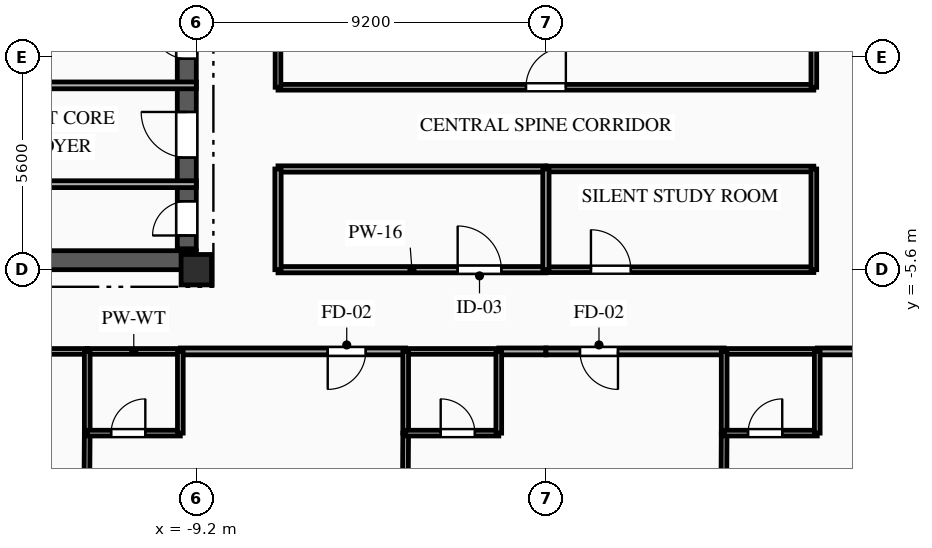
"""IFC4 building model, lengths in metres.
Left out: names, types, materials, properties, quantities, classifications, styles, units other than length and angle.
Written with IfcOpenShell. Run it as: python <this file> out.ifc"""

import sys

from ifc_helpers import new_model, si_unit, direction, frame, frame_2d, origin, origin_2d, place, context, subcontext, project, spatial, rectangle, extrude, element, fill, save


model = new_model("IFC4")
c1 = context("Model", 3, precision=1e-05, world=origin(), true_north=direction((0.0, 1.0)))
c2 = subcontext(c1, "Body", "Model", "MODEL_VIEW")
j1 = project(units=[si_unit("LENGTHUNIT", "METRE"), si_unit("PLANEANGLEUNIT", "RADIAN")], contexts=[c1])
p1 = place(None, origin())
s1 = spatial("IfcSite", under=j1, at=p1, CompositionType="ELEMENT")
p2 = place(p1, origin())
s2 = spatial("IfcBuilding", under=s1, at=p2, CompositionType="ELEMENT")
p3 = place(p2, frame((0.0, 0.0, 193.05)))
s3 = spatial("IfcBuildingStorey", under=s2, at=p3, CompositionType="ELEMENT", Elevation=193.05)
p4 = place(p3, frame((-9.2, -5.6, 0.0), z_axis=(0.0, 0.0, 1.0), x_axis=(1.0, 0.0, 0.0)))
e1 = element("IfcColumn", 1, at=p4, inside=s3, PredefinedType="COLUMN", context=c2, shape_type="SweptSolid", body=[
    extrude(rectangle(XDim=0.8, YDim=0.8, at=origin_2d()), origin(), (0.0, 0.0, 1.0), 3.35),
])
p5 = place(p3, frame((-18.8, -5.35, 0.0), z_axis=(0.0, 0.0, 1.0), x_axis=(1.0, 0.0, 0.0)))
e2 = element("IfcWall", 2, at=p5, inside=s3, PredefinedType="SHEAR", context=c2, shape_type="SweptSolid", body=[
    extrude(rectangle(XDim=9.6, YDim=0.5, at=frame_2d((4.8, 0.0))), origin(), (0.0, 0.0, 1.0), 3.04),
])
p6 = place(p5, frame((1.05, 0.0, 0.0)))
e3 = element("IfcOpeningElement", 3, at=p6, cuts=e2, PredefinedType="OPENING", context=c2, shape_type="SweptSolid", body=[
    extrude(rectangle(XDim=0.9, YDim=2.1, at=frame_2d((0.45, 1.05))), frame((0.0, 0.26, 0.0), z_axis=(0.0, -1.0, 0.0), x_axis=(1.0, 0.0, 0.0)), (0.0, 0.0, 1.0), 0.52),
])
p7 = place(p3, frame((-9.45, -5.05, 0.0), z_axis=(0.0, 0.0, 1.0), x_axis=(0.0, 1.0, 0.0)))
e4 = element("IfcWall", 4, at=p7, inside=s3, PredefinedType="SHEAR", context=c2, shape_type="SweptSolid", body=[
    extrude(rectangle(XDim=10.1, YDim=0.5, at=frame_2d((5.05, 0.0))), origin(), (0.0, 0.0, 1.0), 3.04),
])
p8 = place(p7, frame((7.15, 0.0, 0.0)))
e5 = element("IfcOpeningElement", 5, at=p8, cuts=e4, PredefinedType="OPENING", context=c2, shape_type="SweptSolid", body=[
    extrude(rectangle(XDim=0.9, YDim=2.1, at=frame_2d((0.45, 1.05))), frame((0.0, 0.26, 0.0), z_axis=(0.0, -1.0, 0.0), x_axis=(1.0, 0.0, 0.0)), (0.0, 0.0, 1.0), 0.52),
])
p9 = place(p7, frame((2.4, 0.0, 0.0)))
e6 = element("IfcOpeningElement", 6, at=p9, cuts=e4, PredefinedType="OPENING", context=c2, shape_type="SweptSolid", body=[
    extrude(rectangle(XDim=1.2, YDim=2.15, at=frame_2d((0.6, 1.075))), frame((0.0, 0.26, 0.0), z_axis=(0.0, -1.0, 0.0), x_axis=(1.0, 0.0, 0.0)), (0.0, 0.0, 1.0), 0.52),
])
p10 = place(p7, frame((0.35, 0.0, 0.0)))
e7 = element("IfcOpeningElement", 7, at=p10, cuts=e4, PredefinedType="OPENING", context=c2, shape_type="SweptSolid", body=[
    extrude(rectangle(XDim=0.9, YDim=2.1, at=frame_2d((0.45, 1.05))), frame((0.0, 0.26, 0.0), z_axis=(0.0, -1.0, 0.0), x_axis=(1.0, 0.0, 0.0)), (0.0, 0.0, 1.0), 0.52),
])
p11 = place(p7, frame((5.0, 0.0, 0.0)))
e8 = element("IfcOpeningElement", 8, at=p11, cuts=e4, PredefinedType="OPENING", context=c2, shape_type="SweptSolid", body=[
    extrude(rectangle(XDim=0.9, YDim=2.1, at=frame_2d((0.45, 1.05))), frame((0.0, 0.26, 0.0), z_axis=(0.0, -1.0, 0.0), x_axis=(1.0, 0.0, 0.0)), (0.0, 0.0, 1.0), 0.52),
])
p12 = place(p3, frame((-15.05, -3.35, 0.0), z_axis=(0.0, 0.0, 1.0), x_axis=(1.0, 0.0, 0.0)))
e9 = element("IfcWall", 9, at=p12, inside=s3, PredefinedType="PARTITIONING", context=c2, shape_type="SweptSolid", body=[
    extrude(rectangle(XDim=5.85, YDim=0.18, at=frame_2d((2.925, 0.0))), origin(), (0.0, 0.0, 1.0), 2.755),
])
p13 = place(p3, frame((-9.2, -0.75, 0.0), z_axis=(0.0, 0.0, 1.0), x_axis=(-1.0, 0.0, 0.0)))
e10 = element("IfcWall", 10, at=p13, inside=s3, PredefinedType="PARTITIONING", context=c2, shape_type="SweptSolid", body=[
    extrude(rectangle(XDim=5.85, YDim=0.18, at=frame_2d((2.925, 0.0))), origin(), (0.0, 0.0, 1.0), 3.04),
])
p14 = place(p3, frame((-12.07, -7.75, 0.0), z_axis=(0.0, 0.0, 1.0), x_axis=(-1.0, 0.0, 0.0)))
e11 = element("IfcWall", 11, at=p14, inside=s3, PredefinedType="PARTITIONING", context=c2, shape_type="SweptSolid", body=[
    extrude(rectangle(XDim=8.88, YDim=0.15, at=frame_2d((4.44, 0.0))), origin(), (0.0, 0.0, 1.0), 3.04),
])
p15 = place(p14, frame((1.414, 0.0, 0.0)))
e12 = element("IfcOpeningElement", 12, at=p15, cuts=e11, PredefinedType="OPENING", context=c2, shape_type="SweptSolid", body=[
    extrude(rectangle(XDim=1.05, YDim=2.15, at=frame_2d((0.525, 1.075))), frame((0.0, 0.085, 0.0), z_axis=(0.0, -1.0, 0.0), x_axis=(1.0, 0.0, 0.0)), (0.0, 0.0, 1.0), 0.17),
])
p16 = place(p3, frame((-3.69, -7.75, 0.0), z_axis=(0.0, 0.0, 1.0), x_axis=(-1.0, 0.0, 0.0)))
e13 = element("IfcWall", 13, at=p16, inside=s3, PredefinedType="PARTITIONING", context=c2, shape_type="SweptSolid", body=[
    extrude(rectangle(XDim=5.93, YDim=0.18, at=frame_2d((2.965, 0.0))), origin(), (0.0, 0.0, 1.0), 3.04),
])
p17 = place(p16, frame((1.051, 0.0, 0.0)))
e14 = element("IfcOpeningElement", 14, at=p17, cuts=e13, PredefinedType="OPENING", context=c2, shape_type="SweptSolid", body=[
    extrude(rectangle(XDim=1.0, YDim=2.15, at=frame_2d((0.5, 1.075))), frame((0.0, 0.1, 0.0), z_axis=(0.0, -1.0, 0.0), x_axis=(1.0, 0.0, 0.0)), (0.0, 0.0, 1.0), 0.2),
])
p18 = place(p3, frame((-9.62, -7.75, 0.0), z_axis=(0.0, 0.0, 1.0), x_axis=(-1.0, 0.0, 0.0)))
e15 = element("IfcWall", 15, at=p18, inside=s3, PredefinedType="PLUMBINGWALL", context=c2, shape_type="SweptSolid", body=[
    extrude(rectangle(XDim=2.45, YDim=0.15, at=frame_2d((1.225, 0.0))), origin(), (0.0, 0.0, 1.0), 3.04),
])
p19 = place(p3, frame((0.0, -7.75, 0.0), z_axis=(0.0, 0.0, 1.0), x_axis=(-1.0, 0.0, 0.0)))
e16 = element("IfcWall", 16, at=p19, inside=s3, PredefinedType="PARTITIONING", context=c2, shape_type="SweptSolid", body=[
    extrude(rectangle(XDim=1.24, YDim=0.18, at=frame_2d((0.62, 0.0))), origin(), (0.0, 0.0, 1.0), 3.04),
])
p20 = place(p3, frame((-1.24, -7.75, 0.0), z_axis=(0.0, 0.0, 1.0), x_axis=(-1.0, 0.0, 0.0)))
e17 = element("IfcWall", 17, at=p20, inside=s3, PredefinedType="PLUMBINGWALL", context=c2, shape_type="SweptSolid", body=[
    extrude(rectangle(XDim=2.45, YDim=0.15, at=frame_2d((1.225, 0.0))), origin(), (0.0, 0.0, 1.0), 3.04),
])
p21 = place(p3, frame((-7.05, -5.6, 0.0), z_axis=(0.0, 0.0, 1.0), x_axis=(1.0, 0.0, 0.0)))
e18 = element("IfcWall", 18, at=p21, inside=s3, PredefinedType="PARTITIONING", context=c2, shape_type="SweptSolid", body=[
    extrude(rectangle(XDim=7.05, YDim=0.165, at=frame_2d((3.525, 0.0))), origin(), (0.0, 0.0, 1.0), 2.525),
])
p22 = place(p21, frame((4.728, 0.0, 0.0)))
e19 = element("IfcOpeningElement", 19, at=p22, cuts=e18, PredefinedType="OPENING", context=c2, shape_type="SweptSolid", body=[
    extrude(rectangle(XDim=1.15, YDim=2.15, at=frame_2d((0.575, 1.075))), frame((0.0, 0.093, 0.0), z_axis=(0.0, -1.0, 0.0), x_axis=(1.0, 0.0, 0.0)), (0.0, 0.0, 1.0), 0.185),
])
p23 = place(p3, frame((4.69, -7.75, 0.0), z_axis=(0.0, 0.0, 1.0), x_axis=(-1.0, 0.0, 0.0)))
e20 = element("IfcWall", 20, at=p23, inside=s3, PredefinedType="PARTITIONING", context=c2, shape_type="SweptSolid", body=[
    extrude(rectangle(XDim=4.69, YDim=0.18, at=frame_2d((2.345, 0.0))), origin(), (0.0, 0.0, 1.0), 3.04),
])
p24 = place(p23, frame((2.794, 0.0, 0.0)))
e21 = element("IfcOpeningElement", 21, at=p24, cuts=e20, PredefinedType="OPENING", context=c2, shape_type="SweptSolid", body=[
    extrude(rectangle(XDim=1.0, YDim=2.15, at=frame_2d((0.5, 1.075))), frame((0.0, 0.1, 0.0), z_axis=(0.0, -1.0, 0.0), x_axis=(1.0, 0.0, 0.0)), (0.0, 0.0, 1.0), 0.2),
])
p25 = place(p3, frame((13.07, -7.75, 0.0), z_axis=(0.0, 0.0, 1.0), x_axis=(-1.0, 0.0, 0.0)))
e22 = element("IfcWall", 22, at=p25, inside=s3, PredefinedType="PARTITIONING", context=c2, shape_type="SweptSolid", body=[
    extrude(rectangle(XDim=5.93, YDim=0.18, at=frame_2d((2.965, 0.0))), origin(), (0.0, 0.0, 1.0), 3.04),
])
p26 = place(p25, frame((1.051, 0.0, 0.0)))
e23 = element("IfcOpeningElement", 23, at=p26, cuts=e22, PredefinedType="OPENING", context=c2, shape_type="SweptSolid", body=[
    extrude(rectangle(XDim=1.0, YDim=2.15, at=frame_2d((0.5, 1.075))), frame((0.0, 0.1, 0.0), z_axis=(0.0, -1.0, 0.0), x_axis=(1.0, 0.0, 0.0)), (0.0, 0.0, 1.0), 0.2),
])
p27 = place(p3, frame((7.14, -7.75, 0.0), z_axis=(0.0, 0.0, 1.0), x_axis=(-1.0, 0.0, 0.0)))
e24 = element("IfcWall", 24, at=p27, inside=s3, PredefinedType="PLUMBINGWALL", context=c2, shape_type="SweptSolid", body=[
    extrude(rectangle(XDim=2.45, YDim=0.15, at=frame_2d((1.225, 0.0))), origin(), (0.0, 0.0, 1.0), 3.04),
])
p28 = place(p3, frame((0.0, -5.6, 0.0), z_axis=(0.0, 0.0, 1.0), x_axis=(1.0, 0.0, 0.0)))
e25 = element("IfcWall", 25, at=p28, inside=s3, PredefinedType="PARTITIONING", context=c2, shape_type="SweptSolid", body=[
    extrude(rectangle(XDim=7.05, YDim=0.15, at=frame_2d((3.525, 0.0))), origin(), (0.0, 0.0, 1.0), 2.525),
])
p29 = place(p28, frame((1.185, 0.0, 0.0)))
e26 = element("IfcOpeningElement", 26, at=p29, cuts=e25, PredefinedType="OPENING", context=c2, shape_type="SweptSolid", body=[
    extrude(rectangle(XDim=1.05, YDim=2.15, at=frame_2d((0.525, 1.075))), frame((0.0, 0.085, 0.0), z_axis=(0.0, -1.0, 0.0), x_axis=(1.0, 0.0, 0.0)), (0.0, 0.0, 1.0), 0.17),
])
p30 = place(p3, frame((-7.05, -0.8, 0.0), z_axis=(0.0, 0.0, 1.0), x_axis=(1.0, 0.0, 0.0)))
e27 = element("IfcWall", 27, at=p30, inside=s3, PredefinedType="PARTITIONING", context=c2, shape_type="SweptSolid", body=[
    extrude(rectangle(XDim=14.1, YDim=0.15, at=frame_2d((7.05, 0.0))), origin(), (0.0, 0.0, 1.0), 3.04),
])
p31 = place(p30, frame((6.525, 0.0, 0.0)))
e28 = element("IfcOpeningElement", 28, at=p31, cuts=e27, PredefinedType="OPENING", context=c2, shape_type="SweptSolid", body=[
    extrude(rectangle(XDim=1.05, YDim=2.15, at=frame_2d((0.525, 1.075))), frame((0.0, 0.085, 0.0), z_axis=(0.0, -1.0, 0.0), x_axis=(1.0, 0.0, 0.0)), (0.0, 0.0, 1.0), 0.17),
])
p32 = place(p3, frame((0.0, -2.95, 0.0), z_axis=(0.0, 0.0, 1.0), x_axis=(-1.0, 0.0, 0.0)))
e29 = element("IfcWall", 29, at=p32, inside=s3, PredefinedType="PARTITIONING", context=c2, shape_type="SweptSolid", body=[
    extrude(rectangle(XDim=7.05, YDim=0.165, at=frame_2d((3.525, 0.0))), origin(), (0.0, 0.0, 1.0), 3.04),
])
p33 = place(p3, frame((7.05, -2.95, 0.0), z_axis=(0.0, 0.0, 1.0), x_axis=(-1.0, 0.0, 0.0)))
e30 = element("IfcWall", 30, at=p33, inside=s3, PredefinedType="PARTITIONING", context=c2, shape_type="SweptSolid", body=[
    extrude(rectangle(XDim=7.05, YDim=0.15, at=frame_2d((3.525, 0.0))), origin(), (0.0, 0.0, 1.0), 3.04),
])
p34 = place(p3, frame((-7.05, 8.5, 0.0), z_axis=(0.0, 0.0, 1.0), x_axis=(0.0, -1.0, 0.0)))
e31 = element("IfcWall", 31, at=p34, inside=s3, PredefinedType="PARTITIONING", context=c2, shape_type="SweptSolid", body=[
    extrude(rectangle(XDim=9.3, YDim=0.15, at=frame_2d((4.65, 0.0))), origin(), (0.0, 0.0, 1.0), 3.04),
])
p35 = place(p3, frame((-7.05, -2.95, 0.0), z_axis=(0.0, 0.0, 1.0), x_axis=(0.0, -1.0, 0.0)))
e32 = element("IfcWall", 32, at=p35, inside=s3, PredefinedType="PARTITIONING", context=c2, shape_type="SweptSolid", body=[
    extrude(rectangle(XDim=2.65, YDim=0.165, at=frame_2d((1.325, 0.0))), origin(), (0.0, 0.0, 1.0), 3.04),
])
p36 = place(p3, frame((7.05, -0.8, 0.0), z_axis=(0.0, 0.0, 1.0), x_axis=(0.0, 1.0, 0.0)))
e33 = element("IfcWall", 33, at=p36, inside=s3, PredefinedType="PARTITIONING", context=c2, shape_type="SweptSolid", body=[
    extrude(rectangle(XDim=9.3, YDim=0.15, at=frame_2d((4.65, 0.0))), origin(), (0.0, 0.0, 1.0), 3.04),
])
p37 = place(p3, frame((7.05, -5.6, 0.0), z_axis=(0.0, 0.0, 1.0), x_axis=(0.0, 1.0, 0.0)))
e34 = element("IfcWall", 34, at=p37, inside=s3, PredefinedType="PARTITIONING", context=c2, shape_type="SweptSolid", body=[
    extrude(rectangle(XDim=2.65, YDim=0.15, at=frame_2d((1.325, 0.0))), origin(), (0.0, 0.0, 1.0), 3.04),
])
p38 = place(p3, frame((-12.07, -9.9, 0.0), z_axis=(0.0, 0.0, 1.0), x_axis=(-0.006915995357, -0.999976084218, 0.0)))
e35 = element("IfcWall", 35, at=p38, inside=s3, PredefinedType="PARTITIONING", context=c2, shape_type="SweptSolid", body=[
    extrude(rectangle(XDim=6.354, YDim=0.15, at=frame_2d((3.177, 0.0))), origin(), (0.0, 0.0, 1.0), 3.04),
])
p39 = place(p3, frame((-12.07, -7.75, 0.0), z_axis=(0.0, 0.0, 1.0), x_axis=(0.0, -1.0, 0.0)))
e36 = element("IfcWall", 36, at=p39, inside=s3, PredefinedType="PLUMBINGWALL", context=c2, shape_type="SweptSolid", body=[
    extrude(rectangle(XDim=2.15, YDim=0.15, at=frame_2d((1.075, 0.0))), origin(), (0.0, 0.0, 1.0), 3.04),
])
p40 = place(p3, frame((-12.07, -9.9, 0.0), z_axis=(0.0, 0.0, 1.0), x_axis=(1.0, 0.0, 0.0)))
e37 = element("IfcWall", 37, at=p40, inside=s3, PredefinedType="PLUMBINGWALL", context=c2, shape_type="SweptSolid", body=[
    extrude(rectangle(XDim=2.45, YDim=0.15, at=frame_2d((1.225, 0.0))), origin(), (0.0, 0.0, 1.0), 3.04),
])
p41 = place(p40, frame((0.629, 0.0, 0.0)))
e38 = element("IfcOpeningElement", 38, at=p41, cuts=e37, PredefinedType="OPENING", context=c2, shape_type="SweptSolid", body=[
    extrude(rectangle(XDim=0.9, YDim=2.1, at=frame_2d((0.45, 1.05))), frame((0.0, 0.085, 0.0), z_axis=(0.0, -1.0, 0.0), x_axis=(1.0, 0.0, 0.0)), (0.0, 0.0, 1.0), 0.17),
])
p42 = place(p3, frame((-9.62, -9.9, 0.0), z_axis=(0.0, 0.0, 1.0), x_axis=(0.0, 1.0, 0.0)))
e39 = element("IfcWall", 39, at=p42, inside=s3, PredefinedType="PLUMBINGWALL", context=c2, shape_type="SweptSolid", body=[
    extrude(rectangle(XDim=2.15, YDim=0.15, at=frame_2d((1.075, 0.0))), origin(), (0.0, 0.0, 1.0), 2.665),
])
p43 = place(p3, frame((-3.69, -9.9, 0.0), z_axis=(0.0, 0.0, 1.0), x_axis=(-0.006074196988, -0.999981551895, 0.0)))
e40 = element("IfcWall", 40, at=p43, inside=s3, PredefinedType="PARTITIONING", context=c2, shape_type="SweptSolid", body=[
    extrude(rectangle(XDim=7.235, YDim=0.15, at=frame_2d((3.617, 0.0))), origin(), (0.0, 0.0, 1.0), 3.04),
])
p44 = place(p3, frame((-3.69, -7.75, 0.0), z_axis=(0.0, 0.0, 1.0), x_axis=(0.0, -1.0, 0.0)))
e41 = element("IfcWall", 41, at=p44, inside=s3, PredefinedType="PLUMBINGWALL", context=c2, shape_type="SweptSolid", body=[
    extrude(rectangle(XDim=2.15, YDim=0.15, at=frame_2d((1.075, 0.0))), origin(), (0.0, 0.0, 1.0), 3.04),
])
p45 = place(p3, frame((-3.69, -9.9, 0.0), z_axis=(0.0, 0.0, 1.0), x_axis=(1.0, 0.0, 0.0)))
e42 = element("IfcWall", 42, at=p45, inside=s3, PredefinedType="PLUMBINGWALL", context=c2, shape_type="SweptSolid", body=[
    extrude(rectangle(XDim=2.45, YDim=0.15, at=frame_2d((1.225, 0.0))), origin(), (0.0, 0.0, 1.0), 3.04),
])
p46 = place(p45, frame((0.921, 0.0, 0.0)))
e43 = element("IfcOpeningElement", 43, at=p46, cuts=e42, PredefinedType="OPENING", context=c2, shape_type="SweptSolid", body=[
    extrude(rectangle(XDim=0.9, YDim=2.1, at=frame_2d((0.45, 1.05))), frame((0.0, 0.085, 0.0), z_axis=(0.0, -1.0, 0.0), x_axis=(1.0, 0.0, 0.0)), (0.0, 0.0, 1.0), 0.17),
])
p47 = place(p3, frame((-1.24, -9.9, 0.0), z_axis=(0.0, 0.0, 1.0), x_axis=(0.0, 1.0, 0.0)))
e44 = element("IfcWall", 44, at=p47, inside=s3, PredefinedType="PLUMBINGWALL", context=c2, shape_type="SweptSolid", body=[
    extrude(rectangle(XDim=2.15, YDim=0.15, at=frame_2d((1.075, 0.0))), origin(), (0.0, 0.0, 1.0), 3.04),
])
p48 = place(p3, frame((4.69, -9.9, 0.0), z_axis=(0.0, 0.0, 1.0), x_axis=(-0.005414920161, -0.999985339212, 0.0)))
e45 = element("IfcWall", 45, at=p48, inside=s3, PredefinedType="PARTITIONING", context=c2, shape_type="SweptSolid", body=[
    extrude(rectangle(XDim=8.115, YDim=0.15, at=frame_2d((4.058, 0.0))), origin(), (0.0, 0.0, 1.0), 3.04),
])
p49 = place(p3, frame((4.69, -7.75, 0.0), z_axis=(0.0, 0.0, 1.0), x_axis=(0.0, -1.0, 0.0)))
e46 = element("IfcWall", 46, at=p49, inside=s3, PredefinedType="PLUMBINGWALL", context=c2, shape_type="SweptSolid", body=[
    extrude(rectangle(XDim=2.15, YDim=0.15, at=frame_2d((1.075, 0.0))), origin(), (0.0, 0.0, 1.0), 3.04),
])
p50 = place(p3, frame((4.69, -9.9, 0.0), z_axis=(0.0, 0.0, 1.0), x_axis=(1.0, 0.0, 0.0)))
e47 = element("IfcWall", 47, at=p50, inside=s3, PredefinedType="PLUMBINGWALL", context=c2, shape_type="SweptSolid", body=[
    extrude(rectangle(XDim=2.45, YDim=0.15, at=frame_2d((1.225, 0.0))), origin(), (0.0, 0.0, 1.0), 3.04),
])
p51 = place(p50, frame((0.629, 0.0, 0.0)))
e48 = element("IfcOpeningElement", 48, at=p51, cuts=e47, PredefinedType="OPENING", context=c2, shape_type="SweptSolid", body=[
    extrude(rectangle(XDim=0.9, YDim=2.1, at=frame_2d((0.45, 1.05))), frame((0.0, 0.085, 0.0), z_axis=(0.0, -1.0, 0.0), x_axis=(1.0, 0.0, 0.0)), (0.0, 0.0, 1.0), 0.17),
])
p52 = place(p3, frame((7.14, -9.9, 0.0), z_axis=(0.0, 0.0, 1.0), x_axis=(0.0, 1.0, 0.0)))
e49 = element("IfcWall", 49, at=p52, inside=s3, PredefinedType="PLUMBINGWALL", context=c2, shape_type="SweptSolid", body=[
    extrude(rectangle(XDim=2.15, YDim=0.15, at=frame_2d((1.075, 0.0))), origin(), (0.0, 0.0, 1.0), 3.04),
])
p53 = place(p3, frame((0.0, -2.95, 0.0), z_axis=(0.0, 0.0, 1.0), x_axis=(0.0, -1.0, 0.0)))
e50 = element("IfcWall", 50, at=p53, inside=s3, PredefinedType="PARTITIONING", context=c2, shape_type="SweptSolid", body=[
    extrude(rectangle(XDim=2.65, YDim=0.165, at=frame_2d((1.325, 0.0))), origin(), (0.0, 0.0, 1.0), 3.04),
])
p54 = place(p9, origin())
e51 = element("IfcDoor", 51, at=p54, inside=s3, OperationType="SINGLE_SWING_RIGHT", PredefinedType="DOOR", context=c2, shape_type="SweptSolid", body=[
    extrude(rectangle(XDim=1.2, YDim=2.15, at=frame_2d((0.6, 1.075))), frame((0.0, 0.025, 0.0), z_axis=(0.0, -1.0, 0.0), x_axis=(1.0, 0.0, 0.0)), (0.0, 0.0, 1.0), 0.05),
])
fill(e6, e51)
p55 = place(p10, origin())
e52 = element("IfcDoor", 52, at=p55, inside=s3, OperationType="SINGLE_SWING_LEFT", PredefinedType="DOOR", context=c2, shape_type="SweptSolid", body=[
    extrude(rectangle(XDim=0.9, YDim=2.1, at=frame_2d((0.45, 1.05))), frame((0.0, 0.025, 0.0), z_axis=(0.0, -1.0, 0.0), x_axis=(1.0, 0.0, 0.0)), (0.0, 0.0, 1.0), 0.05),
])
fill(e7, e52)
p56 = place(p11, origin())
e53 = element("IfcDoor", 53, at=p56, inside=s3, OperationType="SINGLE_SWING_RIGHT", PredefinedType="DOOR", context=c2, shape_type="SweptSolid", body=[
    extrude(rectangle(XDim=0.9, YDim=2.1, at=frame_2d((0.45, 1.05))), frame((0.0, 0.025, 0.0), z_axis=(0.0, -1.0, 0.0), x_axis=(1.0, 0.0, 0.0)), (0.0, 0.0, 1.0), 0.05),
])
fill(e8, e53)
p57 = place(p17, origin())
e54 = element("IfcDoor", 54, at=p57, inside=s3, OperationType="SINGLE_SWING_RIGHT", PredefinedType="DOOR", context=c2, shape_type="SweptSolid", body=[
    extrude(rectangle(XDim=1.0, YDim=2.15, at=frame_2d((0.5, 1.075))), frame((0.0, 0.025, 0.0), z_axis=(0.0, -1.0, 0.0), x_axis=(1.0, 0.0, 0.0)), (0.0, 0.0, 1.0), 0.05),
])
fill(e14, e54)
p58 = place(p22, origin())
e55 = element("IfcDoor", 55, at=p58, inside=s3, OperationType="SINGLE_SWING_LEFT", PredefinedType="DOOR", context=c2, shape_type="SweptSolid", body=[
    extrude(rectangle(XDim=1.15, YDim=2.15, at=frame_2d((0.575, 1.075))), frame((0.0, 0.025, 0.0), z_axis=(0.0, -1.0, 0.0), x_axis=(1.0, 0.0, 0.0)), (0.0, 0.0, 1.0), 0.05),
])
fill(e19, e55)
p59 = place(p24, origin())
e56 = element("IfcDoor", 56, at=p59, inside=s3, OperationType="SINGLE_SWING_LEFT", PredefinedType="DOOR", context=c2, shape_type="SweptSolid", body=[
    extrude(rectangle(XDim=1.0, YDim=2.15, at=frame_2d((0.5, 1.075))), frame((0.0, 0.025, 0.0), z_axis=(0.0, -1.0, 0.0), x_axis=(1.0, 0.0, 0.0)), (0.0, 0.0, 1.0), 0.05),
])
fill(e21, e56)
p60 = place(p29, origin())
e57 = element("IfcDoor", 57, at=p60, inside=s3, OperationType="SINGLE_SWING_LEFT", PredefinedType="DOOR", context=c2, shape_type="SweptSolid", body=[
    extrude(rectangle(XDim=1.05, YDim=2.15, at=frame_2d((0.525, 1.075))), frame((0.0, 0.025, 0.0), z_axis=(0.0, -1.0, 0.0), x_axis=(1.0, 0.0, 0.0)), (0.0, 0.0, 1.0), 0.05),
])
fill(e26, e57)
p61 = place(p31, origin())
e58 = element("IfcDoor", 58, at=p61, inside=s3, OperationType="SINGLE_SWING_RIGHT", PredefinedType="DOOR", context=c2, shape_type="SweptSolid", body=[
    extrude(rectangle(XDim=1.05, YDim=2.15, at=frame_2d((0.525, 1.075))), frame((0.0, 0.025, 0.0), z_axis=(0.0, -1.0, 0.0), x_axis=(1.0, 0.0, 0.0)), (0.0, 0.0, 1.0), 0.05),
])
fill(e28, e58)
p62 = place(p41, origin())
e59 = element("IfcDoor", 59, at=p62, inside=s3, OperationType="SINGLE_SWING_RIGHT", PredefinedType="DOOR", context=c2, shape_type="SweptSolid", body=[
    extrude(rectangle(XDim=0.9, YDim=2.1, at=frame_2d((0.45, 1.05))), frame((0.0, 0.025, 0.0), z_axis=(0.0, -1.0, 0.0), x_axis=(1.0, 0.0, 0.0)), (0.0, 0.0, 1.0), 0.05),
])
fill(e38, e59)
p63 = place(p46, origin())
e60 = element("IfcDoor", 60, at=p63, inside=s3, OperationType="SINGLE_SWING_LEFT", PredefinedType="DOOR", context=c2, shape_type="SweptSolid", body=[
    extrude(rectangle(XDim=0.9, YDim=2.1, at=frame_2d((0.45, 1.05))), frame((0.0, 0.025, 0.0), z_axis=(0.0, -1.0, 0.0), x_axis=(1.0, 0.0, 0.0)), (0.0, 0.0, 1.0), 0.05),
])
fill(e43, e60)
p64 = place(p51, origin())
e61 = element("IfcDoor", 61, at=p64, inside=s3, OperationType="SINGLE_SWING_RIGHT", PredefinedType="DOOR", context=c2, shape_type="SweptSolid", body=[
    extrude(rectangle(XDim=0.9, YDim=2.1, at=frame_2d((0.45, 1.05))), frame((0.0, 0.025, 0.0), z_axis=(0.0, -1.0, 0.0), x_axis=(1.0, 0.0, 0.0)), (0.0, 0.0, 1.0), 0.05),
])
fill(e48, e61)
save(model, sys.argv[1])
